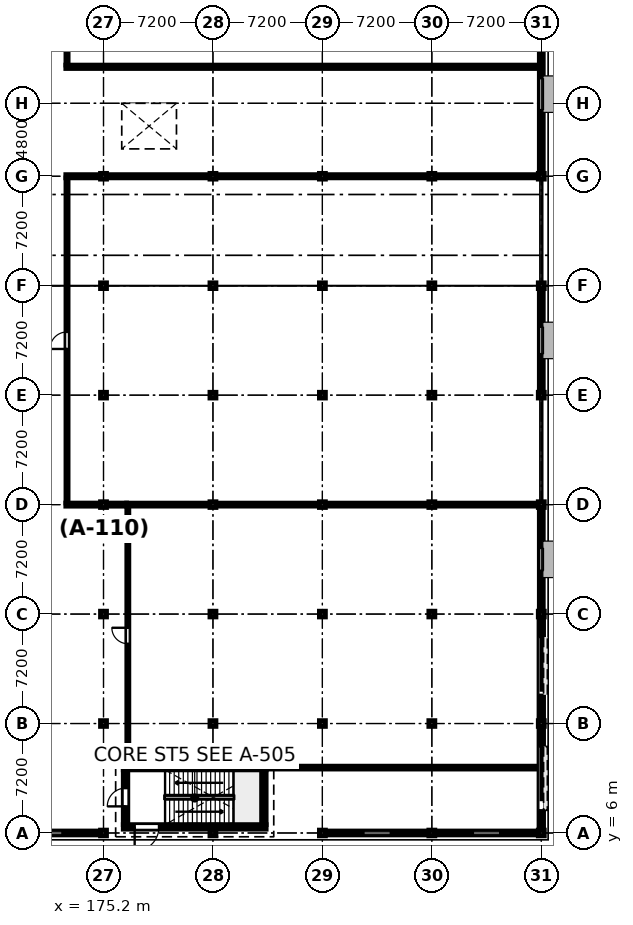
"""IFC4 building model, lengths in metres.
Left out: names, types, materials, properties, quantities, classifications, styles, units other than length and angle.
Written with IfcOpenShell. Run it as: python <this file> out.ifc"""

import sys

from ifc_helpers import new_model, si_unit, direction, frame, frame_2d, origin, origin_2d, place, context, subcontext, project, spatial, rectangle, i_section, extrude, element, fill, save


model = new_model("IFC4")
c1 = context("Model", 3, precision=1e-05, world=origin(), true_north=direction((0.0, 1.0)))
c2 = subcontext(c1, "Body", "Model", "MODEL_VIEW")
j1 = project(units=[si_unit("LENGTHUNIT", "METRE"), si_unit("PLANEANGLEUNIT", "RADIAN")], contexts=[c1])
p1 = place(None, origin())
s1 = spatial("IfcSite", under=j1, at=p1, CompositionType="ELEMENT")
p2 = place(p1, origin())
s2 = spatial("IfcBuilding", under=s1, at=p2, CompositionType="ELEMENT")
p3 = place(p2, origin())
s3 = spatial("IfcBuildingStorey", under=s2, at=p3, CompositionType="ELEMENT", Elevation=0.0)
for number, where, z_axis, x_axis in (
    (1, (175.2, 6.0, 0.0), (0.0, 0.0, 1.0), (1.0, 0.0, 0.0)),
    (2, (175.2, 13.2, 0.0), (0.0, 0.0, 1.0), (1.0, 0.0, 0.0)),
    (3, (175.2, 20.4, 0.0), (0.0, 0.0, 1.0), (1.0, 0.0, 0.0)),
    (4, (175.2, 27.6, 0.0), (0.0, 0.0, 1.0), (1.0, 0.0, 0.0)),
    (5, (175.2, 34.8, 0.0), (0.0, 0.0, 1.0), (1.0, 0.0, 0.0)),
    (6, (175.2, 42.0, 0.0), (0.0, 0.0, 1.0), (1.0, 0.0, 0.0)),
    (7, (175.2, 49.2, 0.0), (0.0, 0.0, 1.0), (1.0, 0.0, 0.0)),
    (8, (182.4, 6.0, 0.0), (0.0, 0.0, 1.0), (1.0, 0.0, 0.0)),
    (9, (182.4, 13.2, 0.0), (0.0, 0.0, 1.0), (1.0, 0.0, 0.0)),
    (10, (182.4, 20.4, 0.0), (0.0, 0.0, 1.0), (1.0, 0.0, 0.0)),
    (11, (182.4, 27.6, 0.0), (0.0, 0.0, 1.0), (1.0, 0.0, 0.0)),
    (12, (182.4, 34.8, 0.0), (0.0, 0.0, 1.0), (1.0, 0.0, 0.0)),
    (13, (182.4, 42.0, 0.0), (0.0, 0.0, 1.0), (1.0, 0.0, 0.0)),
    (14, (182.4, 49.2, 0.0), (0.0, 0.0, 1.0), (1.0, 0.0, 0.0)),
    (15, (189.6, 6.0, 0.0), (0.0, 0.0, 1.0), (1.0, 0.0, 0.0)),
    (16, (189.6, 13.2, 0.0), (0.0, 0.0, 1.0), (1.0, 0.0, 0.0)),
    (17, (189.6, 20.4, 0.0), (0.0, 0.0, 1.0), (1.0, 0.0, 0.0)),
    (18, (189.6, 27.6, 0.0), (0.0, 0.0, 1.0), (1.0, 0.0, 0.0)),
    (19, (189.6, 34.8, 0.0), (0.0, 0.0, 1.0), (1.0, 0.0, 0.0)),
    (20, (189.6, 42.0, 0.0), (0.0, 0.0, 1.0), (1.0, 0.0, 0.0)),
    (21, (189.6, 49.2, 0.0), (0.0, 0.0, 1.0), (1.0, 0.0, 0.0)),
    (22, (196.8, 6.0, 0.0), (0.0, 0.0, 1.0), (1.0, 0.0, 0.0)),
    (23, (196.8, 13.2, 0.0), (0.0, 0.0, 1.0), (1.0, 0.0, 0.0)),
    (24, (196.8, 20.4, 0.0), (0.0, 0.0, 1.0), (1.0, 0.0, 0.0)),
    (25, (196.8, 27.6, 0.0), (0.0, 0.0, 1.0), (1.0, 0.0, 0.0)),
    (26, (196.8, 34.8, 0.0), (0.0, 0.0, 1.0), (1.0, 0.0, 0.0)),
    (27, (196.8, 42.0, 0.0), (0.0, 0.0, 1.0), (1.0, 0.0, 0.0)),
    (28, (196.8, 49.2, 0.0), (0.0, 0.0, 1.0), (1.0, 0.0, 0.0)),
    (29, (204.0, 6.0, 0.0), (0.0, 0.0, 1.0), (1.0, 0.0, 0.0)),
    (30, (204.0, 13.2, 0.0), (0.0, 0.0, 1.0), (1.0, 0.0, 0.0)),
    (31, (204.0, 20.4, 0.0), (0.0, 0.0, 1.0), (1.0, 0.0, 0.0)),
    (32, (204.0, 27.6, 0.0), (0.0, 0.0, 1.0), (1.0, 0.0, 0.0)),
    (33, (204.0, 34.8, 0.0), (0.0, 0.0, 1.0), (1.0, 0.0, 0.0)),
    (34, (204.0, 42.0, 0.0), (0.0, 0.0, 1.0), (1.0, 0.0, 0.0)),
    (35, (204.0, 49.2, 0.0), (0.0, 0.0, 1.0), (1.0, 0.0, 0.0)),
):
    element("IfcColumn", number, at=place(p3, frame(where, z_axis=z_axis, x_axis=x_axis)), inside=s3, PredefinedType="COLUMN", context=c2, shape_type="SweptSolid", body=[
        extrude(i_section(OverallWidth=0.396, OverallDepth=0.381, WebThickness=0.019, FlangeThickness=0.03, FilletRadius=0.015, at=origin_2d()), origin(), (0.0, 0.0, 1.0), 5.4),
    ])
p4 = place(p3, frame((204.0, 13.008, 0.0), z_axis=(0.0, 0.0, 1.0), x_axis=(0.0, -1.0, 0.0)))
e36 = element("IfcWall", 36, at=p4, inside=s3, PredefinedType="STANDARD", context=c2, shape_type="SweptSolid", body=[
    extrude(rectangle(XDim=6.816, YDim=0.3, at=frame_2d((3.408, 0.0))), origin(), (0.0, 0.0, 1.0), 4.442),
])
p5 = place(p4, frame((1.318, 0.0, 0.0)))
e37 = element("IfcOpeningElement", 37, at=p5, cuts=e36, PredefinedType="OPENING", context=c2, shape_type="SweptSolid", body=[
    extrude(rectangle(XDim=4.2, YDim=4.1, at=frame_2d((2.1, 2.05))), frame((0.0, 0.16, 0.0), z_axis=(0.0, -1.0, 0.0), x_axis=(1.0, 0.0, 0.0)), (0.0, 0.0, 1.0), 0.32),
])
p6 = place(p3, frame((204.0, 20.208, 0.0), z_axis=(0.0, 0.0, 1.0), x_axis=(0.0, -1.0, 0.0)))
e38 = element("IfcWall", 38, at=p6, inside=s3, PredefinedType="STANDARD", context=c2, shape_type="SweptSolid", body=[
    extrude(rectangle(XDim=6.816, YDim=0.3, at=frame_2d((3.408, 0.0))), origin(), (0.0, 0.0, 1.0), 4.442),
])
p7 = place(p6, frame((1.318, 0.0, 0.0)))
e39 = element("IfcOpeningElement", 39, at=p7, cuts=e38, PredefinedType="OPENING", context=c2, shape_type="SweptSolid", body=[
    extrude(rectangle(XDim=3.8, YDim=4.0, at=frame_2d((1.9, 2.0))), frame((0.0, 0.16, 0.0), z_axis=(0.0, -1.0, 0.0), x_axis=(1.0, 0.0, 0.0)), (0.0, 0.0, 1.0), 0.32),
])
p8 = place(p3, frame((204.0, 27.408, 0.0), z_axis=(0.0, 0.0, 1.0), x_axis=(0.0, -1.0, 0.0)))
e40 = element("IfcWall", 40, at=p8, inside=s3, PredefinedType="STANDARD", context=c2, shape_type="SweptSolid", body=[
    extrude(rectangle(XDim=6.816, YDim=0.26, at=frame_2d((3.408, 0.0))), origin(), (0.0, 0.0, 1.0), 4.442),
])
p9 = place(p8, frame((2.658, 0.0, 0.9)))
e41 = element("IfcOpeningElement", 41, at=p9, cuts=e40, PredefinedType="OPENING", context=c2, shape_type="SweptSolid", body=[
    extrude(rectangle(XDim=1.5, YDim=1.5, at=frame_2d((0.75, 0.75))), frame((0.0, 0.14, 0.0), z_axis=(0.0, -1.0, 0.0), x_axis=(1.0, 0.0, 0.0)), (0.0, 0.0, 1.0), 0.28),
])
p10 = place(p3, frame((204.0, 41.808, 0.0), z_axis=(0.0, 0.0, 1.0), x_axis=(0.0, -1.0, 0.0)))
e42 = element("IfcWall", 42, at=p10, inside=s3, PredefinedType="STANDARD", context=c2, shape_type="SweptSolid", body=[
    extrude(rectangle(XDim=6.816, YDim=0.26, at=frame_2d((3.408, 0.0))), origin(), (0.0, 0.0, 1.0), 4.442),
])
p11 = place(p10, frame((2.508, 0.0, 0.9)))
e43 = element("IfcOpeningElement", 43, at=p11, cuts=e42, PredefinedType="OPENING", context=c2, shape_type="SweptSolid", body=[
    extrude(rectangle(XDim=1.8, YDim=1.5, at=frame_2d((0.9, 0.75))), frame((0.0, 0.14, 0.0), z_axis=(0.0, -1.0, 0.0), x_axis=(1.0, 0.0, 0.0)), (0.0, 0.0, 1.0), 0.28),
])
p12 = place(p3, frame((204.0, 59.808, 0.0), z_axis=(0.0, 0.0, 1.0), x_axis=(0.0, -1.0, 0.0)))
e44 = element("IfcWall", 44, at=p12, inside=s3, PredefinedType="STANDARD", context=c2, shape_type="SweptSolid", body=[
    extrude(rectangle(XDim=10.416, YDim=0.26, at=frame_2d((5.208, 0.0))), origin(), (0.0, 0.0, 1.0), 4.442),
])
p13 = place(p12, frame((4.158, 0.0, 0.9)))
e45 = element("IfcOpeningElement", 45, at=p13, cuts=e44, PredefinedType="OPENING", context=c2, shape_type="SweptSolid", body=[
    extrude(rectangle(XDim=2.1, YDim=1.5, at=frame_2d((1.05, 0.75))), frame((0.0, 0.14, 0.0), z_axis=(0.0, -1.0, 0.0), x_axis=(1.0, 0.0, 0.0)), (0.0, 0.0, 1.0), 0.28),
])
p14 = place(p3, frame((174.995, 6.0, 0.0), z_axis=(0.0, 0.0, 1.0), x_axis=(-1.0, 0.0, 0.0)))
e46 = element("IfcWall", 46, at=p14, inside=s3, PredefinedType="STANDARD", context=c2, shape_type="SweptSolid", body=[
    extrude(rectangle(XDim=6.79, YDim=0.26, at=frame_2d((3.395, 0.0))), origin(), (0.0, 0.0, 1.0), 4.442),
])
p15 = place(p14, frame((2.495, 0.0, 0.9)))
e47 = element("IfcOpeningElement", 47, at=p15, cuts=e46, PredefinedType="OPENING", context=c2, shape_type="SweptSolid", body=[
    extrude(rectangle(XDim=1.8, YDim=1.5, at=frame_2d((0.9, 0.75))), frame((0.0, 0.14, 0.0), z_axis=(0.0, -1.0, 0.0), x_axis=(1.0, 0.0, 0.0)), (0.0, 0.0, 1.0), 0.28),
])
p16 = place(p3, frame((196.595, 6.0, 0.0), z_axis=(0.0, 0.0, 1.0), x_axis=(-1.0, 0.0, 0.0)))
e48 = element("IfcWall", 48, at=p16, inside=s3, PredefinedType="STANDARD", context=c2, shape_type="SweptSolid", body=[
    extrude(rectangle(XDim=6.79, YDim=0.26, at=frame_2d((3.395, 0.0))), origin(), (0.0, 0.0, 1.0), 4.442),
])
p17 = place(p16, frame((2.495, 0.0, 0.9)))
e49 = element("IfcOpeningElement", 49, at=p17, cuts=e48, PredefinedType="OPENING", context=c2, shape_type="SweptSolid", body=[
    extrude(rectangle(XDim=1.8, YDim=1.5, at=frame_2d((0.9, 0.75))), frame((0.0, 0.14, 0.0), z_axis=(0.0, -1.0, 0.0), x_axis=(1.0, 0.0, 0.0)), (0.0, 0.0, 1.0), 0.28),
])
p18 = place(p3, frame((203.795, 6.0, 0.0), z_axis=(0.0, 0.0, 1.0), x_axis=(-1.0, 0.0, 0.0)))
e50 = element("IfcWall", 50, at=p18, inside=s3, PredefinedType="STANDARD", context=c2, shape_type="SweptSolid", body=[
    extrude(rectangle(XDim=6.79, YDim=0.26, at=frame_2d((3.395, 0.0))), origin(), (0.0, 0.0, 1.0), 4.442),
])
p19 = place(p18, frame((2.495, 0.0, 0.9)))
e51 = element("IfcOpeningElement", 51, at=p19, cuts=e50, PredefinedType="OPENING", context=c2, shape_type="SweptSolid", body=[
    extrude(rectangle(XDim=1.8, YDim=1.5, at=frame_2d((0.9, 0.75))), frame((0.0, 0.14, 0.0), z_axis=(0.0, -1.0, 0.0), x_axis=(1.0, 0.0, 0.0)), (0.0, 0.0, 1.0), 0.28),
])
p20 = place(p3, frame((185.9, 6.4, 0.0), z_axis=(0.0, 0.0, 1.0), x_axis=(-1.0, 0.0, 0.0)))
e52 = element("IfcWall", 52, at=p20, inside=s3, PredefinedType="SOLIDWALL", context=c2, shape_type="SweptSolid", body=[
    extrude(rectangle(XDim=9.4, YDim=0.3, at=frame_2d((4.7, 0.0))), origin(), (0.0, 0.0, 1.0), 5.14),
])
p21 = place(p20, frame((7.05, 0.0, 0.0)))
e53 = element("IfcOpeningElement", 53, at=p21, cuts=e52, PredefinedType="OPENING", context=c2, shape_type="SweptSolid", body=[
    extrude(rectangle(XDim=1.6, YDim=2.15, at=frame_2d((0.8, 1.075))), frame((0.0, 0.16, 0.0), z_axis=(0.0, -1.0, 0.0), x_axis=(1.0, 0.0, 0.0)), (0.0, 0.0, 1.0), 0.32),
])
p22 = place(p3, frame((176.5, 10.3, 0.0), z_axis=(0.0, 0.0, 1.0), x_axis=(1.0, 0.0, 0.0)))
e54 = element("IfcWall", 54, at=p22, inside=s3, PredefinedType="SOLIDWALL", context=c2, shape_type="SweptSolid", body=[
    extrude(rectangle(XDim=9.4, YDim=0.3, at=frame_2d((4.7, 0.0))), origin(), (0.0, 0.0, 1.0), 5.14),
])
p23 = place(p3, frame((176.65, 6.55, 0.0), z_axis=(0.0, 0.0, 1.0), x_axis=(0.0, 1.0, 0.0)))
e55 = element("IfcWall", 55, at=p23, inside=s3, PredefinedType="SOLIDWALL", context=c2, shape_type="SweptSolid", body=[
    extrude(rectangle(XDim=3.6, YDim=0.3, at=frame_2d((1.8, 0.0))), origin(), (0.0, 0.0, 1.0), 5.14),
])
p24 = place(p23, frame((1.2, 0.0, 0.0)))
e56 = element("IfcOpeningElement", 56, at=p24, cuts=e55, PredefinedType="OPENING", context=c2, shape_type="SweptSolid", body=[
    extrude(rectangle(XDim=1.2, YDim=2.2, at=frame_2d((0.6, 1.1))), frame((0.0, 0.16, 0.0), z_axis=(0.0, -1.0, 0.0), x_axis=(1.0, 0.0, 0.0)), (0.0, 0.0, 1.0), 0.32),
])
p25 = place(p3, frame((185.75, 10.15, 0.0), z_axis=(0.0, 0.0, 1.0), x_axis=(0.0, -1.0, 0.0)))
e57 = element("IfcWall", 57, at=p25, inside=s3, PredefinedType="SOLIDWALL", context=c2, shape_type="SweptSolid", body=[
    extrude(rectangle(XDim=3.6, YDim=0.3, at=frame_2d((1.8, 0.0))), origin(), (0.0, 0.0, 1.0), 5.14),
])
p26 = place(p3, frame((203.868, 10.3, 0.0), z_axis=(0.0, 0.0, 1.0), x_axis=(-1.0, 0.0, 0.0)))
e58 = element("IfcWall", 58, at=p26, inside=s3, PredefinedType="PARTITIONING", context=c2, shape_type="SweptSolid", body=[
    extrude(rectangle(XDim=17.966, YDim=0.192, at=frame_2d((8.983, 0.0))), origin(), (0.0, 0.0, 1.0), 4.437),
])
p27 = place(p3, frame((176.72, 27.6, 0.0), z_axis=(0.0, 0.0, 1.0), x_axis=(1.0, 0.0, 0.0)))
e59 = element("IfcWall", 59, at=p27, inside=s3, PredefinedType="PARTITIONING", context=c2, shape_type="SweptSolid", body=[
    extrude(rectangle(XDim=27.148, YDim=0.198, at=frame_2d((13.574, 0.0))), origin(), (0.0, 0.0, 1.0), 4.437),
])
p28 = place(p3, frame((176.718, 27.6, 0.0), z_axis=(0.0, 0.0, 1.0), x_axis=(-1.0, 0.0, 0.0)))
e60 = element("IfcWall", 60, at=p28, inside=s3, PredefinedType="PARTITIONING", context=c2, shape_type="SweptSolid", body=[
    extrude(rectangle(XDim=3.998, YDim=0.205, at=frame_2d((1.999, 0.0))), origin(), (0.0, 0.0, 1.0), 4.437),
])
p29 = place(p3, frame((172.72, 49.2, 0.0), z_axis=(0.0, 0.0, 1.0), x_axis=(1.0, 0.0, 0.0)))
e61 = element("IfcWall", 61, at=p29, inside=s3, PredefinedType="PARTITIONING", context=c2, shape_type="SweptSolid", body=[
    extrude(rectangle(XDim=31.148, YDim=0.212, at=frame_2d((15.574, 0.0))), origin(), (0.0, 0.0, 1.0), 4.437),
])
p30 = place(p3, frame((203.868, 56.4, 0.0), z_axis=(0.0, 0.0, 1.0), x_axis=(-1.0, 0.0, 0.0)))
e62 = element("IfcWall", 62, at=p30, inside=s3, PredefinedType="PARTITIONING", context=c2, shape_type="SweptSolid", body=[
    extrude(rectangle(XDim=31.148, YDim=0.225, at=frame_2d((15.574, 0.0))), origin(), (0.0, 0.0, 1.0), 4.437),
])
p31 = place(p3, frame((176.8, 10.452, 0.0), z_axis=(0.0, 0.0, 1.0), x_axis=(0.0, 1.0, 0.0)))
e63 = element("IfcWall", 63, at=p31, inside=s3, PredefinedType="PARTITIONING", context=c2, shape_type="SweptSolid", body=[
    extrude(rectangle(XDim=17.044, YDim=0.135, at=frame_2d((8.522, 0.0))), origin(), (0.0, 0.0, 1.0), 4.437),
])
p32 = place(p31, frame((7.997, 0.0, 0.0)))
e64 = element("IfcOpeningElement", 64, at=p32, cuts=e63, PredefinedType="OPENING", context=c2, shape_type="SweptSolid", body=[
    extrude(rectangle(XDim=1.05, YDim=2.22, at=frame_2d((0.525, 1.11))), frame((0.0, 0.077, 0.0), z_axis=(0.0, -1.0, 0.0), x_axis=(1.0, 0.0, 0.0)), (0.0, 0.0, 1.0), 0.155),
])
p33 = place(p3, frame((172.8, 27.705, 0.0), z_axis=(0.0, 0.0, 1.0), x_axis=(0.0, 1.0, 0.0)))
e65 = element("IfcWall", 65, at=p33, inside=s3, PredefinedType="PARTITIONING", context=c2, shape_type="SweptSolid", body=[
    extrude(rectangle(XDim=21.387, YDim=0.14, at=frame_2d((10.693, 0.0))), origin(), (0.0, 0.0, 1.0), 4.437),
])
p34 = place(p33, frame((10.134, 0.0, 0.0)))
e66 = element("IfcOpeningElement", 66, at=p34, cuts=e65, PredefinedType="OPENING", context=c2, shape_type="SweptSolid", body=[
    extrude(rectangle(XDim=1.12, YDim=2.22, at=frame_2d((0.56, 1.11))), frame((0.0, 0.08, 0.0), z_axis=(0.0, -1.0, 0.0), x_axis=(1.0, 0.0, 0.0)), (0.0, 0.0, 1.0), 0.16),
])
p35 = place(p3, frame((172.8, 56.514, 0.0), z_axis=(0.0, 0.0, 1.0), x_axis=(0.0, 1.0, 0.0)))
e67 = element("IfcWall", 67, at=p35, inside=s3, PredefinedType="PARTITIONING", context=c2, shape_type="SweptSolid", body=[
    extrude(rectangle(XDim=29.766, YDim=0.145, at=frame_2d((14.883, 0.0))), origin(), (0.0, 0.0, 1.0), 4.437),
])
p36 = place(p35, frame((14.253, 0.0, 0.0)))
e68 = element("IfcOpeningElement", 68, at=p36, cuts=e67, PredefinedType="OPENING", context=c2, shape_type="SweptSolid", body=[
    extrude(rectangle(XDim=1.26, YDim=2.22, at=frame_2d((0.63, 1.11))), frame((0.0, 0.083, 0.0), z_axis=(0.0, -1.0, 0.0), x_axis=(1.0, 0.0, 0.0)), (0.0, 0.0, 1.0), 0.165),
])
p37 = place(p35, frame((16.763, 0.0, 0.95)))
e69 = element("IfcOpeningElement", 69, at=p37, cuts=e67, PredefinedType="OPENING", context=c2, shape_type="SweptSolid", body=[
    extrude(rectangle(XDim=1.1, YDim=1.3, at=frame_2d((0.55, 0.65))), frame((0.0, 0.083, 0.0), z_axis=(0.0, -1.0, 0.0), x_axis=(1.0, 0.0, 0.0)), (0.0, 0.0, 1.0), 0.165),
])
p38 = place(p5, origin())
e70 = element("IfcDoor", 70, at=p38, inside=s3, OperationType="ROLLINGUP", PredefinedType="GATE", context=c2, shape_type="SweptSolid", body=[
    extrude(rectangle(XDim=4.2, YDim=4.1, at=frame_2d((2.1, 2.05))), frame((0.0, 0.025, 0.0), z_axis=(0.0, -1.0, 0.0), x_axis=(1.0, 0.0, 0.0)), (0.0, 0.0, 1.0), 0.05),
])
fill(e37, e70)
p39 = place(p7, origin())
e71 = element("IfcDoor", 71, at=p39, inside=s3, OperationType="ROLLINGUP", PredefinedType="GATE", context=c2, shape_type="SweptSolid", body=[
    extrude(rectangle(XDim=3.8, YDim=4.0, at=frame_2d((1.9, 2.0))), frame((0.0, 0.025, 0.0), z_axis=(0.0, -1.0, 0.0), x_axis=(1.0, 0.0, 0.0)), (0.0, 0.0, 1.0), 0.05),
])
fill(e39, e71)
p40 = place(p9, origin())
e72 = element("IfcWindow", 72, at=p40, inside=s3, PartitioningType="SINGLE_PANEL", PredefinedType="WINDOW", context=c2, shape_type="SweptSolid", body=[
    extrude(rectangle(XDim=1.5, YDim=1.5, at=frame_2d((0.75, 0.75))), frame((0.0, 0.03, 0.0), z_axis=(0.0, -1.0, 0.0), x_axis=(1.0, 0.0, 0.0)), (0.0, 0.0, 1.0), 0.06),
])
fill(e41, e72)
p41 = place(p11, origin())
e73 = element("IfcWindow", 73, at=p41, inside=s3, PartitioningType="SINGLE_PANEL", PredefinedType="WINDOW", context=c2, shape_type="SweptSolid", body=[
    extrude(rectangle(XDim=1.8, YDim=1.5, at=frame_2d((0.9, 0.75))), frame((0.0, 0.03, 0.0), z_axis=(0.0, -1.0, 0.0), x_axis=(1.0, 0.0, 0.0)), (0.0, 0.0, 1.0), 0.06),
])
fill(e43, e73)
p42 = place(p13, origin())
e74 = element("IfcWindow", 74, at=p42, inside=s3, PartitioningType="SINGLE_PANEL", PredefinedType="WINDOW", context=c2, shape_type="SweptSolid", body=[
    extrude(rectangle(XDim=2.1, YDim=1.5, at=frame_2d((1.05, 0.75))), frame((0.0, 0.03, 0.0), z_axis=(0.0, -1.0, 0.0), x_axis=(1.0, 0.0, 0.0)), (0.0, 0.0, 1.0), 0.06),
])
fill(e45, e74)
p43 = place(p15, origin())
e75 = element("IfcWindow", 75, at=p43, inside=s3, PartitioningType="SINGLE_PANEL", PredefinedType="WINDOW", context=c2, shape_type="SweptSolid", body=[
    extrude(rectangle(XDim=1.8, YDim=1.5, at=frame_2d((0.9, 0.75))), frame((0.0, 0.03, 0.0), z_axis=(0.0, -1.0, 0.0), x_axis=(1.0, 0.0, 0.0)), (0.0, 0.0, 1.0), 0.06),
])
fill(e47, e75)
p44 = place(p17, origin())
e76 = element("IfcWindow", 76, at=p44, inside=s3, PartitioningType="SINGLE_PANEL", PredefinedType="WINDOW", context=c2, shape_type="SweptSolid", body=[
    extrude(rectangle(XDim=1.8, YDim=1.5, at=frame_2d((0.9, 0.75))), frame((0.0, 0.03, 0.0), z_axis=(0.0, -1.0, 0.0), x_axis=(1.0, 0.0, 0.0)), (0.0, 0.0, 1.0), 0.06),
])
fill(e49, e76)
p45 = place(p19, origin())
e77 = element("IfcWindow", 77, at=p45, inside=s3, PartitioningType="SINGLE_PANEL", PredefinedType="WINDOW", context=c2, shape_type="SweptSolid", body=[
    extrude(rectangle(XDim=1.8, YDim=1.5, at=frame_2d((0.9, 0.75))), frame((0.0, 0.03, 0.0), z_axis=(0.0, -1.0, 0.0), x_axis=(1.0, 0.0, 0.0)), (0.0, 0.0, 1.0), 0.06),
])
fill(e51, e77)
p46 = place(p21, origin())
e78 = element("IfcDoor", 78, at=p46, inside=s3, OperationType="SINGLE_SWING_RIGHT", PredefinedType="DOOR", context=c2, shape_type="SweptSolid", body=[
    extrude(rectangle(XDim=1.6, YDim=2.15, at=frame_2d((0.8, 1.075))), frame((0.0, 0.025, 0.0), z_axis=(0.0, -1.0, 0.0), x_axis=(1.0, 0.0, 0.0)), (0.0, 0.0, 1.0), 0.05),
])
fill(e53, e78)
p47 = place(p24, origin())
e79 = element("IfcDoor", 79, at=p47, inside=s3, OperationType="SINGLE_SWING_LEFT", PredefinedType="DOOR", context=c2, shape_type="SweptSolid", body=[
    extrude(rectangle(XDim=1.2, YDim=2.2, at=frame_2d((0.6, 1.1))), frame((0.0, 0.025, 0.0), z_axis=(0.0, -1.0, 0.0), x_axis=(1.0, 0.0, 0.0)), (0.0, 0.0, 1.0), 0.05),
])
fill(e56, e79)
p48 = place(p32, origin())
e80 = element("IfcDoor", 80, at=p48, inside=s3, OperationType="SINGLE_SWING_RIGHT", PredefinedType="DOOR", context=c2, shape_type="SweptSolid", body=[
    extrude(rectangle(XDim=1.05, YDim=2.22, at=frame_2d((0.525, 1.11))), frame((0.0, 0.025, 0.0), z_axis=(0.0, -1.0, 0.0), x_axis=(1.0, 0.0, 0.0)), (0.0, 0.0, 1.0), 0.05),
])
fill(e64, e80)
p49 = place(p34, origin())
e81 = element("IfcDoor", 81, at=p49, inside=s3, OperationType="SINGLE_SWING_LEFT", PredefinedType="DOOR", context=c2, shape_type="SweptSolid", body=[
    extrude(rectangle(XDim=1.12, YDim=2.22, at=frame_2d((0.56, 1.11))), frame((0.0, 0.025, 0.0), z_axis=(0.0, -1.0, 0.0), x_axis=(1.0, 0.0, 0.0)), (0.0, 0.0, 1.0), 0.05),
])
fill(e66, e81)
save(model, sys.argv[1])
